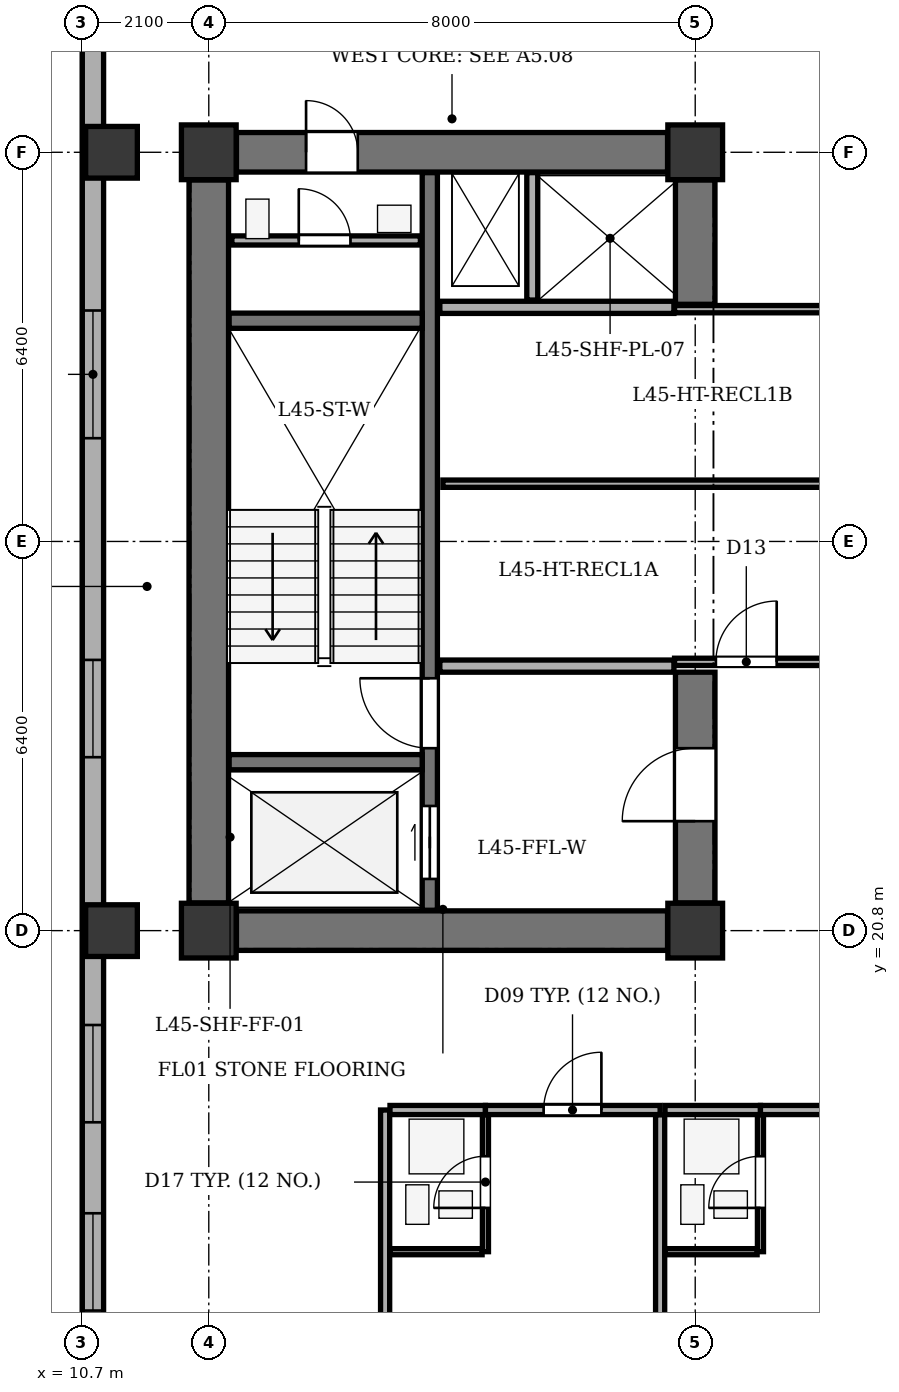
"""IFC4 building model, lengths in metres.
Left out: names, types, materials, properties, quantities, classifications, styles, units other than length and angle.
Written with IfcOpenShell. Run it as: python <this file> out.ifc"""

import sys

from ifc_helpers import new_model, si_unit, direction, frame, frame_2d, origin, origin_2d, place, context, subcontext, project, spatial, rectangle, extrude, element, fill, save


model = new_model("IFC4")
c1 = context("Model", 3, precision=1e-05, world=origin(), true_north=direction((0.0, 1.0)))
c2 = subcontext(c1, "Body", "Model", "MODEL_VIEW")
j1 = project(units=[si_unit("LENGTHUNIT", "METRE"), si_unit("PLANEANGLEUNIT", "RADIAN")], contexts=[c1])
p1 = place(None, origin())
s1 = spatial("IfcSite", under=j1, at=p1, CompositionType="ELEMENT")
p2 = place(p1, origin())
s2 = spatial("IfcBuilding", under=s1, at=p2, CompositionType="ELEMENT")
p3 = place(p2, frame((0.0, 0.0, 176.3)))
s3 = spatial("IfcBuildingStorey", under=s2, at=p3, CompositionType="ELEMENT", Elevation=176.3)
for number, where, z_axis, x_axis in (
    (1, (12.8, 20.8, 0.0), (0.0, 0.0, 1.0), (1.0, 0.0, 0.0)),
    (2, (20.8, 20.8, 0.0), (0.0, 0.0, 1.0), (1.0, 0.0, 0.0)),
    (3, (12.8, 33.6, 0.0), (0.0, 0.0, 1.0), (1.0, 0.0, 0.0)),
    (4, (20.8, 33.6, 0.0), (0.0, 0.0, 1.0), (1.0, 0.0, 0.0)),
):
    element("IfcColumn", number, at=place(p3, frame(where, z_axis=z_axis, x_axis=x_axis)), inside=s3, PredefinedType="COLUMN", context=c2, shape_type="SweptSolid", body=[
        extrude(rectangle(XDim=0.9, YDim=0.9, at=origin_2d()), origin(), (0.0, 0.0, 1.0), 3.5),
    ])
for number, where, z_axis, x_axis in (
    (5, (11.2, 20.8, 0.0), (0.0, 0.0, 1.0), (1.0, 0.0, 0.0)),
    (6, (11.2, 33.6, 0.0), (0.0, 0.0, 1.0), (1.0, 0.0, 0.0)),
):
    element("IfcColumn", number, at=place(p3, frame(where, z_axis=z_axis, x_axis=x_axis)), inside=s3, PredefinedType="COLUMN", context=c2, shape_type="SweptSolid", body=[
        extrude(rectangle(XDim=0.85, YDim=0.85, at=origin_2d()), origin(), (0.0, 0.0, 1.0), 3.5),
    ])
p4 = place(p3, frame((10.895, 12.9, 0.0), z_axis=(0.0, 0.0, 1.0), x_axis=(0.0, 1.0, 0.0)))
e7 = element("IfcWall", 7, at=p4, inside=s3, PredefinedType="STANDARD", context=c2, shape_type="SweptSolid", body=[
    extrude(rectangle(XDim=35.0, YDim=0.35, at=frame_2d((17.5, 0.0))), origin(), (0.0, 0.0, 1.0), 2.785),
])
p5 = place(p4, frame((1.652, 0.0, 0.75)))
e8 = element("IfcOpeningElement", 8, at=p5, cuts=e7, PredefinedType="OPENING", context=c2, shape_type="SweptSolid", body=[
    extrude(rectangle(XDim=1.6, YDim=1.75, at=frame_2d((0.8, 0.875))), frame((0.0, 0.185, 0.0), z_axis=(0.0, -1.0, 0.0), x_axis=(1.0, 0.0, 0.0)), (0.0, 0.0, 1.0), 0.37),
])
p6 = place(p4, frame((4.748, 0.0, 0.75)))
e9 = element("IfcOpeningElement", 9, at=p6, cuts=e7, PredefinedType="OPENING", context=c2, shape_type="SweptSolid", body=[
    extrude(rectangle(XDim=1.6, YDim=1.75, at=frame_2d((0.8, 0.875))), frame((0.0, 0.185, 0.0), z_axis=(0.0, -1.0, 0.0), x_axis=(1.0, 0.0, 0.0)), (0.0, 0.0, 1.0), 0.37),
])
p7 = place(p4, frame((10.752, 0.0, 0.75)))
e10 = element("IfcOpeningElement", 10, at=p7, cuts=e7, PredefinedType="OPENING", context=c2, shape_type="SweptSolid", body=[
    extrude(rectangle(XDim=1.6, YDim=1.75, at=frame_2d((0.8, 0.875))), frame((0.0, 0.185, 0.0), z_axis=(0.0, -1.0, 0.0), x_axis=(1.0, 0.0, 0.0)), (0.0, 0.0, 1.0), 0.37),
])
p8 = place(p4, frame((15.998, 0.0, 0.75)))
e11 = element("IfcOpeningElement", 11, at=p8, cuts=e7, PredefinedType="OPENING", context=c2, shape_type="SweptSolid", body=[
    extrude(rectangle(XDim=2.1, YDim=1.75, at=frame_2d((1.05, 0.875))), frame((0.0, 0.185, 0.0), z_axis=(0.0, -1.0, 0.0), x_axis=(1.0, 0.0, 0.0)), (0.0, 0.0, 1.0), 0.37),
])
p9 = place(p4, frame((23.916, 0.0, 0.75)))
e12 = element("IfcOpeningElement", 12, at=p9, cuts=e7, PredefinedType="OPENING", context=c2, shape_type="SweptSolid", body=[
    extrude(rectangle(XDim=1.6, YDim=1.75, at=frame_2d((0.8, 0.875))), frame((0.0, 0.185, 0.0), z_axis=(0.0, -1.0, 0.0), x_axis=(1.0, 0.0, 0.0)), (0.0, 0.0, 1.0), 0.37),
])
p10 = place(p4, frame((29.834, 0.0, 0.75)))
e13 = element("IfcOpeningElement", 13, at=p10, cuts=e7, PredefinedType="OPENING", context=c2, shape_type="SweptSolid", body=[
    extrude(rectangle(XDim=2.1, YDim=1.75, at=frame_2d((1.05, 0.875))), frame((0.0, 0.185, 0.0), z_axis=(0.0, -1.0, 0.0), x_axis=(1.0, 0.0, 0.0)), (0.0, 0.0, 1.0), 0.37),
])
p11 = place(p3, frame((12.8, 21.255, 0.0), z_axis=(0.0, 0.0, 1.0), x_axis=(0.0, 1.0, 0.0)))
e14 = element("IfcWall", 14, at=p11, inside=s3, PredefinedType="SHEAR", context=c2, shape_type="SweptSolid", body=[
    extrude(rectangle(XDim=11.89, YDim=0.65, at=frame_2d((5.945, 0.0))), origin(), (0.0, 0.0, 1.0), 3.2),
])
p12 = place(p3, frame((13.255, 20.8, 0.0), z_axis=(0.0, 0.0, 1.0), x_axis=(1.0, 0.0, 0.0)))
e15 = element("IfcWall", 15, at=p12, inside=s3, PredefinedType="SHEAR", context=c2, shape_type="SweptSolid", body=[
    extrude(rectangle(XDim=7.09, YDim=0.65, at=frame_2d((3.545, 0.0))), origin(), (0.0, 0.0, 1.0), 3.2),
])
p13 = place(p3, frame((13.255, 33.6, 0.0), z_axis=(0.0, 0.0, 1.0), x_axis=(1.0, 0.0, 0.0)))
e16 = element("IfcWall", 16, at=p13, inside=s3, PredefinedType="SHEAR", context=c2, shape_type="SweptSolid", body=[
    extrude(rectangle(XDim=7.09, YDim=0.65, at=frame_2d((3.545, 0.0))), origin(), (0.0, 0.0, 1.0), 3.2),
])
p14 = place(p13, frame((1.145, 0.0, 0.0)))
e17 = element("IfcOpeningElement", 17, at=p14, cuts=e16, PredefinedType="OPENING", context=c2, shape_type="SweptSolid", body=[
    extrude(rectangle(XDim=0.85, YDim=2.02, at=frame_2d((0.425, 1.01))), frame((0.0, 0.335, 0.0), z_axis=(0.0, -1.0, 0.0), x_axis=(1.0, 0.0, 0.0)), (0.0, 0.0, 1.0), 0.67),
])
p15 = place(p3, frame((20.8, 21.255, 0.0), z_axis=(0.0, 0.0, 1.0), x_axis=(0.0, 1.0, 0.0)))
e18 = element("IfcWall", 18, at=p15, inside=s3, PredefinedType="SHEAR", context=c2, shape_type="SweptSolid", body=[
    extrude(rectangle(XDim=3.795, YDim=0.65, at=frame_2d((1.897, 0.0))), origin(), (0.0, 0.0, 1.0), 3.2),
])
p16 = place(p15, frame((1.345, 0.0, 0.0)))
e19 = element("IfcOpeningElement", 19, at=p16, cuts=e18, PredefinedType="OPENING", context=c2, shape_type="SweptSolid", body=[
    extrude(rectangle(XDim=1.2, YDim=2.15, at=frame_2d((0.6, 1.075))), frame((0.0, 0.335, 0.0), z_axis=(0.0, -1.0, 0.0), x_axis=(1.0, 0.0, 0.0)), (0.0, 0.0, 1.0), 0.67),
])
p17 = place(p3, frame((20.8, 31.1, 0.0), z_axis=(0.0, 0.0, 1.0), x_axis=(0.0, 1.0, 0.0)))
e20 = element("IfcWall", 20, at=p17, inside=s3, PredefinedType="SHEAR", context=c2, shape_type="SweptSolid", body=[
    extrude(rectangle(XDim=2.045, YDim=0.65, at=frame_2d((1.022, 0.0))), origin(), (0.0, 0.0, 1.0), 3.2),
])
p18 = place(p3, frame((16.435, 21.135, 0.0), z_axis=(0.0, 0.0, 1.0), x_axis=(0.0, 1.0, 0.0)))
e21 = element("IfcWall", 21, at=p18, inside=s3, PredefinedType="SHEAR", context=c2, shape_type="SweptSolid", body=[
    extrude(rectangle(XDim=12.13, YDim=0.25, at=frame_2d((6.065, 0.0))), origin(), (0.0, 0.0, 1.0), 3.2),
])
p19 = place(p18, frame((0.515, 0.0, 0.0)))
e22 = element("IfcOpeningElement", 22, at=p19, cuts=e21, PredefinedType="OPENING", context=c2, shape_type="SweptSolid", body=[
    extrude(rectangle(XDim=1.2, YDim=2.15, at=frame_2d((0.6, 1.075))), frame((0.0, 0.135, 0.0), z_axis=(0.0, -1.0, 0.0), x_axis=(1.0, 0.0, 0.0)), (0.0, 0.0, 1.0), 0.27),
])
p20 = place(p18, frame((2.665, 0.0, 0.0)))
e23 = element("IfcOpeningElement", 23, at=p20, cuts=e21, PredefinedType="OPENING", context=c2, shape_type="SweptSolid", body=[
    extrude(rectangle(XDim=1.15, YDim=2.15, at=frame_2d((0.575, 1.075))), frame((0.0, 0.135, 0.0), z_axis=(0.0, -1.0, 0.0), x_axis=(1.0, 0.0, 0.0)), (0.0, 0.0, 1.0), 0.27),
])
for number, where, z_axis, x_axis in (
    (24, (13.135, 23.57, 0.0), (0.0, 0.0, 1.0), (1.0, 0.0, 0.0)),
    (25, (13.135, 30.83, 0.0), (0.0, 0.0, 1.0), (1.0, 0.0, 0.0)),
):
    element("IfcWall", number, at=place(p3, frame(where, z_axis=z_axis, x_axis=x_axis)), inside=s3, PredefinedType="SHEAR", context=c2, shape_type="SweptSolid", body=[
        extrude(rectangle(XDim=3.175, YDim=0.25, at=frame_2d((1.587, 0.0))), origin(), (0.0, 0.0, 1.0), 3.2),
    ])
for number, where, z_axis, x_axis in (
    (26, (16.6, 25.15, 0.0), (0.0, 0.0, 1.0), (1.0, 0.0, 0.0)),
    (27, (16.6, 31.05, 0.0), (0.0, 0.0, 1.0), (1.0, 0.0, 0.0)),
):
    element("IfcWall", number, at=place(p3, frame(where, z_axis=z_axis, x_axis=x_axis)), inside=s3, PredefinedType="SOLIDWALL", context=c2, shape_type="SweptSolid", body=[
        extrude(rectangle(XDim=3.85, YDim=0.2, at=frame_2d((1.925, 0.0))), origin(), (0.0, 0.0, 1.0), 3.2),
    ])
p21 = place(p3, frame((18.12, 31.17, 0.0), z_axis=(0.0, 0.0, 1.0), x_axis=(0.0, 1.0, 0.0)))
e28 = element("IfcWall", 28, at=p21, inside=s3, PredefinedType="PARTITIONING", context=c2, shape_type="SweptSolid", body=[
    extrude(rectangle(XDim=2.095, YDim=0.18, at=frame_2d((1.047, 0.0))), origin(), (0.0, 0.0, 1.0), 3.2),
])
p22 = place(p3, frame((13.18, 32.15, 0.0), z_axis=(0.0, 0.0, 1.0), x_axis=(1.0, 0.0, 0.0)))
e29 = element("IfcWall", 29, at=p22, inside=s3, PredefinedType="PARTITIONING", context=c2, shape_type="SweptSolid", body=[
    extrude(rectangle(XDim=3.1, YDim=0.15, at=frame_2d((1.55, 0.0))), origin(), (0.0, 0.0, 1.0), 3.2),
])
p23 = place(p22, frame((1.1, 0.0, 0.0)))
e30 = element("IfcOpeningElement", 30, at=p23, cuts=e29, PredefinedType="OPENING", context=c2, shape_type="SweptSolid", body=[
    extrude(rectangle(XDim=0.85, YDim=2.02, at=frame_2d((0.425, 1.01))), frame((0.0, 0.085, 0.0), z_axis=(0.0, -1.0, 0.0), x_axis=(1.0, 0.0, 0.0)), (0.0, 0.0, 1.0), 0.17),
])
p24 = place(p3, frame((20.46, 25.22, 0.0), z_axis=(0.0, 0.0, 1.0), x_axis=(1.0, 0.0, 0.0)))
e31 = element("IfcWall", 31, at=p24, inside=s3, PredefinedType="PARTITIONING", context=c2, shape_type="SweptSolid", body=[
    extrude(rectangle(XDim=11.94, YDim=0.12, at=frame_2d((5.97, 0.0))), origin(), (0.0, 0.0, 1.0), 3.2),
])
p25 = place(p24, frame((0.68, 0.0, 0.0)))
e32 = element("IfcOpeningElement", 32, at=p25, cuts=e31, PredefinedType="OPENING", context=c2, shape_type="SweptSolid", body=[
    extrude(rectangle(XDim=1.0, YDim=2.1, at=frame_2d((0.5, 1.05))), frame((0.0, 0.07, 0.0), z_axis=(0.0, -1.0, 0.0), x_axis=(1.0, 0.0, 0.0)), (0.0, 0.0, 1.0), 0.14),
])
p26 = place(p3, frame((20.46, 31.02, 0.0), z_axis=(0.0, 0.0, 1.0), x_axis=(1.0, 0.0, 0.0)))
e33 = element("IfcWall", 33, at=p26, inside=s3, PredefinedType="PARTITIONING", context=c2, shape_type="SweptSolid", body=[
    extrude(rectangle(XDim=11.94, YDim=0.12, at=frame_2d((5.97, 0.0))), origin(), (0.0, 0.0, 1.0), 3.2),
])
p27 = place(p3, frame((16.65, 28.15, 0.0), z_axis=(0.0, 0.0, 1.0), x_axis=(1.0, 0.0, 0.0)))
e34 = element("IfcWall", 34, at=p27, inside=s3, PredefinedType="PARTITIONING", context=c2, shape_type="SweptSolid", body=[
    extrude(rectangle(XDim=8.885, YDim=0.12, at=frame_2d((4.442, 0.0))), origin(), (0.0, 0.0, 1.0), 3.2),
])
p28 = place(p3, frame((15.7, 8.275, 0.0), z_axis=(0.0, 0.0, 1.0), x_axis=(0.0, 1.0, 0.0)))
e35 = element("IfcWall", 35, at=p28, inside=s3, PredefinedType="PARTITIONING", context=c2, shape_type="SweptSolid", body=[
    extrude(rectangle(XDim=9.575, YDim=0.15, at=frame_2d((4.788, 0.0))), origin(), (0.0, 0.0, 1.0), 3.2),
])
p29 = place(p3, frame((15.78, 17.85, 0.0), z_axis=(0.0, 0.0, 1.0), x_axis=(1.0, 0.0, 0.0)))
e36 = element("IfcWall", 36, at=p29, inside=s3, PredefinedType="PARTITIONING", context=c2, shape_type="SweptSolid", body=[
    extrude(rectangle(XDim=1.57, YDim=0.15, at=frame_2d((0.785, 0.0))), origin(), (0.0, 0.0, 1.0), 3.2),
])
p30 = place(p3, frame((17.35, 17.85, 0.0), z_axis=(0.0, 0.0, 1.0), x_axis=(1.0, 0.0, 0.0)))
e37 = element("IfcWall", 37, at=p30, inside=s3, PredefinedType="PARTITIONING", context=c2, shape_type="SweptSolid", body=[
    extrude(rectangle(XDim=2.873, YDim=0.15, at=frame_2d((1.437, 0.0))), origin(), (0.0, 0.0, 1.0), 3.2),
])
p31 = place(p30, frame((0.957, 0.0, 0.0)))
e38 = element("IfcOpeningElement", 38, at=p31, cuts=e37, PredefinedType="OPENING", context=c2, shape_type="SweptSolid", body=[
    extrude(rectangle(XDim=0.95, YDim=2.1, at=frame_2d((0.475, 1.05))), frame((0.0, 0.085, 0.0), z_axis=(0.0, -1.0, 0.0), x_axis=(1.0, 0.0, 0.0)), (0.0, 0.0, 1.0), 0.17),
])
p32 = place(p3, frame((17.35, 15.52, 0.0), z_axis=(0.0, 0.0, 1.0), x_axis=(0.0, 1.0, 0.0)))
e39 = element("IfcWall", 39, at=p32, inside=s3, PredefinedType="PARTITIONING", context=c2, shape_type="SweptSolid", body=[
    extrude(rectangle(XDim=2.25, YDim=0.1, at=frame_2d((1.125, 0.0))), origin(), (0.0, 0.0, 1.0), 3.2),
])
p33 = place(p32, frame((0.72, 0.0, 0.0)))
e40 = element("IfcOpeningElement", 40, at=p33, cuts=e39, PredefinedType="OPENING", context=c2, shape_type="SweptSolid", body=[
    extrude(rectangle(XDim=0.85, YDim=2.05, at=frame_2d((0.425, 1.025))), frame((0.0, 0.06, 0.0), z_axis=(0.0, -1.0, 0.0), x_axis=(1.0, 0.0, 0.0)), (0.0, 0.0, 1.0), 0.12),
])
p34 = place(p3, frame((15.78, 15.52, 0.0), z_axis=(0.0, 0.0, 1.0), x_axis=(1.0, 0.0, 0.0)))
e41 = element("IfcWall", 41, at=p34, inside=s3, PredefinedType="PARTITIONING", context=c2, shape_type="SweptSolid", body=[
    extrude(rectangle(XDim=1.515, YDim=0.1, at=frame_2d((0.757, 0.0))), origin(), (0.0, 0.0, 1.0), 3.2),
])
p35 = place(p3, frame((20.223, 8.275, 0.0), z_axis=(0.0, 0.0, 1.0), x_axis=(0.0, 1.0, 0.0)))
e42 = element("IfcWall", 42, at=p35, inside=s3, PredefinedType="PARTITIONING", context=c2, shape_type="SweptSolid", body=[
    extrude(rectangle(XDim=9.495, YDim=0.15, at=frame_2d((4.748, 0.0))), origin(), (0.0, 0.0, 1.0), 3.2),
])
p36 = place(p3, frame((20.303, 17.85, 0.0), z_axis=(0.0, 0.0, 1.0), x_axis=(1.0, 0.0, 0.0)))
e43 = element("IfcWall", 43, at=p36, inside=s3, PredefinedType="PARTITIONING", context=c2, shape_type="SweptSolid", body=[
    extrude(rectangle(XDim=1.57, YDim=0.15, at=frame_2d((0.785, 0.0))), origin(), (0.0, 0.0, 1.0), 3.2),
])
p37 = place(p3, frame((21.873, 17.85, 0.0), z_axis=(0.0, 0.0, 1.0), x_axis=(1.0, 0.0, 0.0)))
e44 = element("IfcWall", 44, at=p37, inside=s3, PredefinedType="PARTITIONING", context=c2, shape_type="SweptSolid", body=[
    extrude(rectangle(XDim=3.174, YDim=0.15, at=frame_2d((1.587, 0.0))), origin(), (0.0, 0.0, 1.0), 3.2),
])
p38 = place(p37, frame((1.107, 0.0, 0.0)))
e45 = element("IfcOpeningElement", 45, at=p38, cuts=e44, PredefinedType="OPENING", context=c2, shape_type="SweptSolid", body=[
    extrude(rectangle(XDim=0.95, YDim=2.1, at=frame_2d((0.475, 1.05))), frame((0.0, 0.085, 0.0), z_axis=(0.0, -1.0, 0.0), x_axis=(1.0, 0.0, 0.0)), (0.0, 0.0, 1.0), 0.17),
])
p39 = place(p3, frame((21.873, 15.52, 0.0), z_axis=(0.0, 0.0, 1.0), x_axis=(0.0, 1.0, 0.0)))
e46 = element("IfcWall", 46, at=p39, inside=s3, PredefinedType="PARTITIONING", context=c2, shape_type="SweptSolid", body=[
    extrude(rectangle(XDim=2.25, YDim=0.1, at=frame_2d((1.125, 0.0))), origin(), (0.0, 0.0, 1.0), 3.2),
])
p40 = place(p39, frame((0.72, 0.0, 0.0)))
e47 = element("IfcOpeningElement", 47, at=p40, cuts=e46, PredefinedType="OPENING", context=c2, shape_type="SweptSolid", body=[
    extrude(rectangle(XDim=0.85, YDim=2.05, at=frame_2d((0.425, 1.025))), frame((0.0, 0.06, 0.0), z_axis=(0.0, -1.0, 0.0), x_axis=(1.0, 0.0, 0.0)), (0.0, 0.0, 1.0), 0.12),
])
p41 = place(p3, frame((20.303, 15.52, 0.0), z_axis=(0.0, 0.0, 1.0), x_axis=(1.0, 0.0, 0.0)))
e48 = element("IfcWall", 48, at=p41, inside=s3, PredefinedType="PARTITIONING", context=c2, shape_type="SweptSolid", body=[
    extrude(rectangle(XDim=1.515, YDim=0.1, at=frame_2d((0.758, 0.0))), origin(), (0.0, 0.0, 1.0), 3.2),
])
p42 = place(p5, origin())
e49 = element("IfcWindow", 49, at=p42, inside=s3, PartitioningType="SINGLE_PANEL", PredefinedType="WINDOW", context=c2, shape_type="SweptSolid", body=[
    extrude(rectangle(XDim=1.6, YDim=1.75, at=frame_2d((0.8, 0.875))), frame((0.0, -0.01, 0.0), z_axis=(0.0, -1.0, 0.0), x_axis=(1.0, 0.0, 0.0)), (0.0, 0.0, 1.0), 0.06),
])
fill(e8, e49)
p43 = place(p6, origin())
e50 = element("IfcWindow", 50, at=p43, inside=s3, PartitioningType="SINGLE_PANEL", PredefinedType="WINDOW", context=c2, shape_type="SweptSolid", body=[
    extrude(rectangle(XDim=1.6, YDim=1.75, at=frame_2d((0.8, 0.875))), frame((0.0, -0.01, 0.0), z_axis=(0.0, -1.0, 0.0), x_axis=(1.0, 0.0, 0.0)), (0.0, 0.0, 1.0), 0.06),
])
fill(e9, e50)
p44 = place(p7, origin())
e51 = element("IfcWindow", 51, at=p44, inside=s3, PartitioningType="SINGLE_PANEL", PredefinedType="WINDOW", context=c2, shape_type="SweptSolid", body=[
    extrude(rectangle(XDim=1.6, YDim=1.75, at=frame_2d((0.8, 0.875))), frame((0.0, -0.01, 0.0), z_axis=(0.0, -1.0, 0.0), x_axis=(1.0, 0.0, 0.0)), (0.0, 0.0, 1.0), 0.06),
])
fill(e10, e51)
p45 = place(p8, origin())
e52 = element("IfcWindow", 52, at=p45, inside=s3, PartitioningType="SINGLE_PANEL", PredefinedType="WINDOW", context=c2, shape_type="SweptSolid", body=[
    extrude(rectangle(XDim=2.1, YDim=1.75, at=frame_2d((1.05, 0.875))), frame((0.0, -0.01, 0.0), z_axis=(0.0, -1.0, 0.0), x_axis=(1.0, 0.0, 0.0)), (0.0, 0.0, 1.0), 0.06),
])
fill(e11, e52)
p46 = place(p14, origin())
e53 = element("IfcDoor", 53, at=p46, inside=s3, OperationType="SINGLE_SWING_LEFT", PredefinedType="DOOR", context=c2, shape_type="SweptSolid", body=[
    extrude(rectangle(XDim=0.85, YDim=2.02, at=frame_2d((0.425, 1.01))), frame((0.0, 0.025, 0.0), z_axis=(0.0, -1.0, 0.0), x_axis=(1.0, 0.0, 0.0)), (0.0, 0.0, 1.0), 0.05),
])
fill(e17, e53)
p47 = place(p16, origin())
e54 = element("IfcDoor", 54, at=p47, inside=s3, OperationType="SINGLE_SWING_LEFT", PredefinedType="DOOR", context=c2, shape_type="SweptSolid", body=[
    extrude(rectangle(XDim=1.2, YDim=2.15, at=frame_2d((0.6, 1.075))), frame((0.0, 0.025, 0.0), z_axis=(0.0, -1.0, 0.0), x_axis=(1.0, 0.0, 0.0)), (0.0, 0.0, 1.0), 0.05),
])
fill(e19, e54)
p48 = place(p19, origin())
e55 = element("IfcDoor", 55, at=p48, inside=s3, OperationType="DOUBLE_DOOR_SLIDING", PredefinedType="DOOR", context=c2, shape_type="SweptSolid", body=[
    extrude(rectangle(XDim=1.2, YDim=2.15, at=frame_2d((0.6, 1.075))), frame((0.0, 0.025, 0.0), z_axis=(0.0, -1.0, 0.0), x_axis=(1.0, 0.0, 0.0)), (0.0, 0.0, 1.0), 0.05),
])
fill(e22, e55)
p49 = place(p20, origin())
e56 = element("IfcDoor", 56, at=p49, inside=s3, OperationType="SINGLE_SWING_RIGHT", PredefinedType="DOOR", context=c2, shape_type="SweptSolid", body=[
    extrude(rectangle(XDim=1.15, YDim=2.15, at=frame_2d((0.575, 1.075))), frame((0.0, 0.025, 0.0), z_axis=(0.0, -1.0, 0.0), x_axis=(1.0, 0.0, 0.0)), (0.0, 0.0, 1.0), 0.05),
])
fill(e23, e56)
p50 = place(p23, origin())
e57 = element("IfcDoor", 57, at=p50, inside=s3, OperationType="SINGLE_SWING_LEFT", PredefinedType="DOOR", context=c2, shape_type="SweptSolid", body=[
    extrude(rectangle(XDim=0.85, YDim=2.02, at=frame_2d((0.425, 1.01))), frame((0.0, 0.025, 0.0), z_axis=(0.0, -1.0, 0.0), x_axis=(1.0, 0.0, 0.0)), (0.0, 0.0, 1.0), 0.05),
])
fill(e30, e57)
p51 = place(p25, origin())
e58 = element("IfcDoor", 58, at=p51, inside=s3, OperationType="SINGLE_SWING_RIGHT", PredefinedType="DOOR", context=c2, shape_type="SweptSolid", body=[
    extrude(rectangle(XDim=1.0, YDim=2.1, at=frame_2d((0.5, 1.05))), frame((0.0, 0.025, 0.0), z_axis=(0.0, -1.0, 0.0), x_axis=(1.0, 0.0, 0.0)), (0.0, 0.0, 1.0), 0.05),
])
fill(e32, e58)
p52 = place(p33, origin())
e59 = element("IfcDoor", 59, at=p52, inside=s3, OperationType="SINGLE_SWING_LEFT", PredefinedType="DOOR", context=c2, shape_type="SweptSolid", body=[
    extrude(rectangle(XDim=0.85, YDim=2.05, at=frame_2d((0.425, 1.025))), frame((0.0, 0.025, 0.0), z_axis=(0.0, -1.0, 0.0), x_axis=(1.0, 0.0, 0.0)), (0.0, 0.0, 1.0), 0.05),
])
fill(e40, e59)
p53 = place(p31, origin())
e60 = element("IfcDoor", 60, at=p53, inside=s3, OperationType="SINGLE_SWING_RIGHT", PredefinedType="DOOR", context=c2, shape_type="SweptSolid", body=[
    extrude(rectangle(XDim=0.95, YDim=2.1, at=frame_2d((0.475, 1.05))), frame((0.0, 0.025, 0.0), z_axis=(0.0, -1.0, 0.0), x_axis=(1.0, 0.0, 0.0)), (0.0, 0.0, 1.0), 0.05),
])
fill(e38, e60)
p54 = place(p40, origin())
e61 = element("IfcDoor", 61, at=p54, inside=s3, OperationType="SINGLE_SWING_LEFT", PredefinedType="DOOR", context=c2, shape_type="SweptSolid", body=[
    extrude(rectangle(XDim=0.85, YDim=2.05, at=frame_2d((0.425, 1.025))), frame((0.0, 0.025, 0.0), z_axis=(0.0, -1.0, 0.0), x_axis=(1.0, 0.0, 0.0)), (0.0, 0.0, 1.0), 0.05),
])
fill(e47, e61)
save(model, sys.argv[1])
